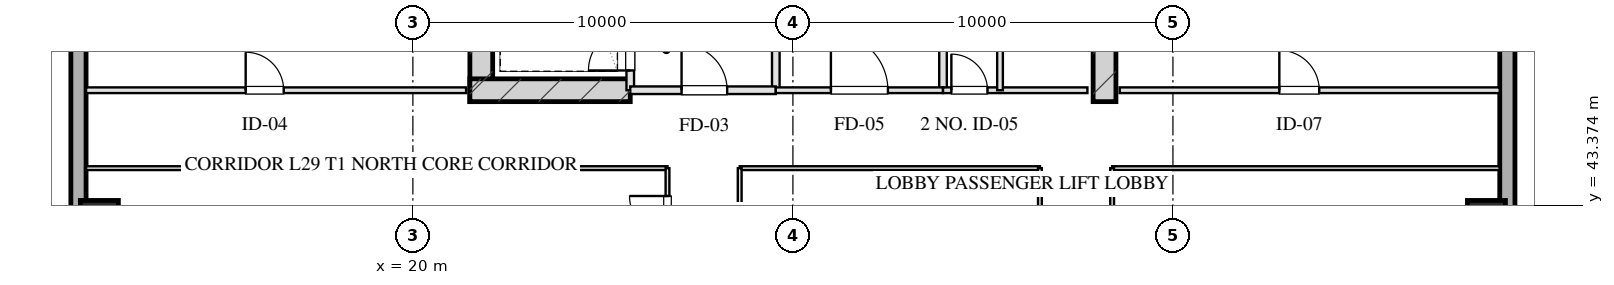
"""IFC4 building model, lengths in metres.
Left out: names, types, materials, properties, quantities, classifications, styles, units other than length and angle.
Written with IfcOpenShell. Run it as: python <this file> out.ifc"""

import sys

from ifc_helpers import new_model, si_unit, direction, frame, frame_2d, origin, origin_2d, place, context, subcontext, project, spatial, rectangle, hollow_rectangle, extrude, element, fill, save


model = new_model("IFC4")
c1 = context("Model", 3, precision=1e-05, world=origin(), true_north=direction((0.0, 1.0)))
c2 = subcontext(c1, "Body", "Model", "MODEL_VIEW")
j1 = project(units=[si_unit("LENGTHUNIT", "METRE"), si_unit("PLANEANGLEUNIT", "RADIAN")], contexts=[c1])
p1 = place(None, origin())
s1 = spatial("IfcSite", under=j1, at=p1, CompositionType="ELEMENT")
p2 = place(p1, origin())
s2 = spatial("IfcBuilding", under=s1, at=p2, CompositionType="ELEMENT")
p3 = place(p2, frame((0.0, 0.0, 113.85)))
s3 = spatial("IfcBuildingStorey", under=s2, at=p3, CompositionType="ELEMENT", Elevation=113.85)
for number, where, z_axis, x_axis in (
    (1, (21.8, 46.1, 0.0), (0.0, 0.0, 1.0), (0.0, 1.0, 0.0)),
    (2, (38.2, 46.1, 0.0), (0.0, 0.0, 1.0), (0.0, 1.0, 0.0)),
):
    element("IfcWall", number, at=place(p3, frame(where, z_axis=z_axis, x_axis=x_axis)), inside=s3, PredefinedType="SHEAR", context=c2, shape_type="SweptSolid", body=[
        extrude(rectangle(XDim=9.48, YDim=0.6, at=frame_2d((4.74, 0.0))), origin(), (0.0, 0.0, 1.0), 3.45),
    ])
p4 = place(p3, frame((21.5, 46.4, 0.0), z_axis=(0.0, 0.0, 1.0), x_axis=(1.0, 0.0, 0.0)))
e3 = element("IfcWall", 3, at=p4, inside=s3, PredefinedType="SHEAR", context=c2, shape_type="SweptSolid", body=[
    extrude(rectangle(XDim=4.22, YDim=0.6, at=frame_2d((2.11, 0.0))), origin(), (0.0, 0.0, 1.0), 3.45),
])
for number, where, z_axis, x_axis in (
    (4, (11.75, 43.0, 0.0), (0.0, 0.0, 1.0), (1.0, 0.0, 0.0)),
    (5, (48.25, 43.0, 0.0), (0.0, 0.0, 1.0), (1.0, 0.0, 0.0)),
):
    element("IfcColumn", number, at=place(p3, frame(where, z_axis=z_axis, x_axis=x_axis)), inside=s3, PredefinedType="COLUMN", context=c2, shape_type="SweptSolid", body=[
        extrude(hollow_rectangle(XDim=1.0, YDim=1.0, WallThickness=0.036, at=origin_2d()), origin(), (0.0, 0.0, 1.0), 3.451),
    ])
p5 = place(p3, frame((11.2, 9.0, 0.0), z_axis=(0.0, 0.0, 1.0), x_axis=(0.0, 1.0, 0.0)))
e6 = element("IfcWall", 6, at=p5, inside=s3, PredefinedType="SOLIDWALL", context=c2, shape_type="SweptSolid", body=[
    extrude(rectangle(XDim=50.0, YDim=0.4, at=frame_2d((25.0, 0.0))), origin(), (0.0, 0.0, 1.0), 2.61),
])
p6 = place(p5, frame((27.336, 0.0, 0.0)))
e7 = element("IfcOpeningElement", 7, at=p6, cuts=e6, PredefinedType="OPENING", context=c2, shape_type="SweptSolid", body=[
    extrude(rectangle(XDim=1.1, YDim=2.15, at=frame_2d((0.55, 1.075))), frame((0.0, 0.21, 0.0), z_axis=(0.0, -1.0, 0.0), x_axis=(1.0, 0.0, 0.0)), (0.0, 0.0, 1.0), 0.42),
])
p7 = place(p3, frame((48.8, 59.0, 0.0), z_axis=(0.0, 0.0, 1.0), x_axis=(0.0, -1.0, 0.0)))
e8 = element("IfcWall", 8, at=p7, inside=s3, PredefinedType="SOLIDWALL", context=c2, shape_type="SweptSolid", body=[
    extrude(rectangle(XDim=50.0, YDim=0.4, at=frame_2d((25.0, 0.0))), origin(), (0.0, 0.0, 1.0), 2.61),
])
p8 = place(p7, frame((30.2, 0.0, 0.75)))
e9 = element("IfcOpeningElement", 9, at=p8, cuts=e8, PredefinedType="OPENING", context=c2, shape_type="SweptSolid", body=[
    extrude(rectangle(XDim=2.4, YDim=1.46, at=frame_2d((1.2, 0.73))), frame((0.0, 0.21, 0.0), z_axis=(0.0, -1.0, 0.0), x_axis=(1.0, 0.0, 0.0)), (0.0, 0.0, 1.0), 0.42),
])
p9 = place(p7, frame((18.65, 0.0, 0.0)))
e10 = element("IfcOpeningElement", 10, at=p9, cuts=e8, PredefinedType="OPENING", context=c2, shape_type="SweptSolid", body=[
    extrude(rectangle(XDim=1.1, YDim=2.15, at=frame_2d((0.55, 1.075))), frame((0.0, 0.21, 0.0), z_axis=(0.0, -1.0, 0.0), x_axis=(1.0, 0.0, 0.0)), (0.0, 0.0, 1.0), 0.42),
])
p10 = place(p3, frame((25.72, 46.4, 0.0), z_axis=(0.0, 0.0, 1.0), x_axis=(0.0, 1.0, 0.0)))
e11 = element("IfcWall", 11, at=p10, inside=s3, PredefinedType="PARTITIONING", context=c2, shape_type="SweptSolid", body=[
    extrude(rectangle(XDim=1.9, YDim=0.2, at=frame_2d((0.95, 0.0))), origin(), (0.0, 0.0, 1.0), 3.175),
])
p11 = place(p10, frame((0.52, 0.0, 0.0)))
e12 = element("IfcOpeningElement", 12, at=p11, cuts=e11, PredefinedType="OPENING", context=c2, shape_type="SweptSolid", body=[
    extrude(rectangle(XDim=1.1, YDim=2.05, at=frame_2d((0.55, 1.025))), frame((0.0, 0.11, 0.0), z_axis=(0.0, -1.0, 0.0), x_axis=(1.0, 0.0, 0.0)), (0.0, 0.0, 1.0), 0.22),
])
p12 = place(p3, frame((29.55, 46.4, 0.0), z_axis=(0.0, 0.0, 1.0), x_axis=(0.0, 1.0, 0.0)))
e13 = element("IfcWall", 13, at=p12, inside=s3, PredefinedType="PARTITIONING", context=c2, shape_type="SweptSolid", body=[
    extrude(rectangle(XDim=8.43, YDim=0.2, at=frame_2d((4.215, 0.0))), origin(), (0.0, 0.0, 1.0), 3.175),
])
p13 = place(p3, frame((25.72, 46.4, 0.0), z_axis=(0.0, 0.0, 1.0), x_axis=(1.0, 0.0, 0.0)))
e14 = element("IfcWall", 14, at=p13, inside=s3, PredefinedType="PARTITIONING", context=c2, shape_type="SweptSolid", body=[
    extrude(rectangle(XDim=3.83, YDim=0.2, at=frame_2d((1.915, 0.0))), origin(), (0.0, 0.0, 1.0), 3.175),
])
p14 = place(p13, frame((1.35, 0.0, 0.0)))
e15 = element("IfcOpeningElement", 15, at=p14, cuts=e14, PredefinedType="OPENING", context=c2, shape_type="SweptSolid", body=[
    extrude(rectangle(XDim=1.2, YDim=2.05, at=frame_2d((0.6, 1.025))), frame((0.0, 0.11, 0.0), z_axis=(0.0, -1.0, 0.0), x_axis=(1.0, 0.0, 0.0)), (0.0, 0.0, 1.0), 0.22),
])
p15 = place(p3, frame((33.95, 46.4, 0.0), z_axis=(0.0, 0.0, 1.0), x_axis=(0.0, 1.0, 0.0)))
e16 = element("IfcWall", 16, at=p15, inside=s3, PredefinedType="PARTITIONING", context=c2, shape_type="SweptSolid", body=[
    extrude(rectangle(XDim=8.43, YDim=0.2, at=frame_2d((4.215, 0.0))), origin(), (0.0, 0.0, 1.0), 3.175),
])
p16 = place(p3, frame((29.55, 46.4, 0.0), z_axis=(0.0, 0.0, 1.0), x_axis=(1.0, 0.0, 0.0)))
e17 = element("IfcWall", 17, at=p16, inside=s3, PredefinedType="PARTITIONING", context=c2, shape_type="SweptSolid", body=[
    extrude(rectangle(XDim=4.4, YDim=0.15, at=frame_2d((2.2, 0.0))), origin(), (0.0, 0.0, 1.0), 3.175),
])
p17 = place(p16, frame((1.45, 0.0, 0.0)))
e18 = element("IfcOpeningElement", 18, at=p17, cuts=e17, PredefinedType="OPENING", context=c2, shape_type="SweptSolid", body=[
    extrude(rectangle(XDim=1.5, YDim=2.05, at=frame_2d((0.75, 1.025))), frame((0.0, 0.085, 0.0), z_axis=(0.0, -1.0, 0.0), x_axis=(1.0, 0.0, 0.0)), (0.0, 0.0, 1.0), 0.17),
])
p18 = place(p3, frame((33.95, 46.4, 0.0), z_axis=(0.0, 0.0, 1.0), x_axis=(1.0, 0.0, 0.0)))
e19 = element("IfcWall", 19, at=p18, inside=s3, PredefinedType="PARTITIONING", context=c2, shape_type="SweptSolid", body=[
    extrude(rectangle(XDim=3.8, YDim=0.15, at=frame_2d((1.9, 0.0))), origin(), (0.0, 0.0, 1.0), 3.175),
])
p19 = place(p18, frame((0.22, 0.0, 0.0)))
e20 = element("IfcOpeningElement", 20, at=p19, cuts=e19, PredefinedType="OPENING", context=c2, shape_type="SweptSolid", body=[
    extrude(rectangle(XDim=0.95, YDim=2.05, at=frame_2d((0.475, 1.025))), frame((0.0, 0.085, 0.0), z_axis=(0.0, -1.0, 0.0), x_axis=(1.0, 0.0, 0.0)), (0.0, 0.0, 1.0), 0.17),
])
p20 = place(p3, frame((35.45, 46.4, 0.0), z_axis=(0.0, 0.0, 1.0), x_axis=(0.0, 1.0, 0.0)))
e21 = element("IfcWall", 21, at=p20, inside=s3, PredefinedType="PARTITIONING", context=c2, shape_type="SweptSolid", body=[
    extrude(rectangle(XDim=8.43, YDim=0.15, at=frame_2d((4.215, 0.0))), origin(), (0.0, 0.0, 1.0), 2.815),
])
p21 = place(p20, frame((2.55, 0.0, 0.0)))
e22 = element("IfcOpeningElement", 22, at=p21, cuts=e21, PredefinedType="OPENING", context=c2, shape_type="SweptSolid", body=[
    extrude(rectangle(XDim=0.95, YDim=2.05, at=frame_2d((0.475, 1.025))), frame((0.0, 0.085, 0.0), z_axis=(0.0, -1.0, 0.0), x_axis=(1.0, 0.0, 0.0)), (0.0, 0.0, 1.0), 0.17),
])
p22 = place(p20, frame((5.8, 0.0, 0.0)))
e23 = element("IfcOpeningElement", 23, at=p22, cuts=e21, PredefinedType="OPENING", context=c2, shape_type="SweptSolid", body=[
    extrude(rectangle(XDim=0.9, YDim=2.05, at=frame_2d((0.45, 1.025))), frame((0.0, 0.085, 0.0), z_axis=(0.0, -1.0, 0.0), x_axis=(1.0, 0.0, 0.0)), (0.0, 0.0, 1.0), 0.17),
])
p23 = place(p3, frame((11.4, 46.4, 0.0), z_axis=(0.0, 0.0, 1.0), x_axis=(1.0, 0.0, 0.0)))
e24 = element("IfcWall", 24, at=p23, inside=s3, PredefinedType="PARTITIONING", context=c2, shape_type="SweptSolid", body=[
    extrude(rectangle(XDim=10.0, YDim=0.15, at=frame_2d((5.0, 0.0))), origin(), (0.0, 0.0, 1.0), 3.175),
])
p24 = place(p23, frame((4.2, 0.0, 0.0)))
e25 = element("IfcOpeningElement", 25, at=p24, cuts=e24, PredefinedType="OPENING", context=c2, shape_type="SweptSolid", body=[
    extrude(rectangle(XDim=1.0, YDim=2.05, at=frame_2d((0.5, 1.025))), frame((0.0, 0.085, 0.0), z_axis=(0.0, -1.0, 0.0), x_axis=(1.0, 0.0, 0.0)), (0.0, 0.0, 1.0), 0.17),
])
p25 = place(p3, frame((38.6, 46.4, 0.0), z_axis=(0.0, 0.0, 1.0), x_axis=(1.0, 0.0, 0.0)))
e26 = element("IfcWall", 26, at=p25, inside=s3, PredefinedType="PARTITIONING", context=c2, shape_type="SweptSolid", body=[
    extrude(rectangle(XDim=10.0, YDim=0.15, at=frame_2d((5.0, 0.0))), origin(), (0.0, 0.0, 1.0), 3.175),
])
p26 = place(p25, frame((4.2, 0.0, 0.0)))
e27 = element("IfcOpeningElement", 27, at=p26, cuts=e26, PredefinedType="OPENING", context=c2, shape_type="SweptSolid", body=[
    extrude(rectangle(XDim=1.05, YDim=2.05, at=frame_2d((0.525, 1.025))), frame((0.0, 0.085, 0.0), z_axis=(0.0, -1.0, 0.0), x_axis=(1.0, 0.0, 0.0)), (0.0, 0.0, 1.0), 0.17),
])
p27 = place(p3, frame((11.4, 44.35, 0.0), z_axis=(0.0, 0.0, 1.0), x_axis=(1.0, 0.0, 0.0)))
e28 = element("IfcWall", 28, at=p27, inside=s3, PredefinedType="MOVABLE", context=c2, shape_type="SweptSolid", body=[
    extrude(rectangle(XDim=15.3, YDim=0.1, at=frame_2d((7.65, 0.0))), origin(), (0.0, 0.0, 1.0), 3.175),
])
p28 = place(p3, frame((28.6, 44.35, 0.0), z_axis=(0.0, 0.0, 1.0), x_axis=(1.0, 0.0, 0.0)))
e29 = element("IfcWall", 29, at=p28, inside=s3, PredefinedType="MOVABLE", context=c2, shape_type="SweptSolid", body=[
    extrude(rectangle(XDim=7.9, YDim=0.1, at=frame_2d((3.95, 0.0))), origin(), (0.0, 0.0, 1.0), 3.175),
])
p29 = place(p3, frame((38.4, 44.35, 0.0), z_axis=(0.0, 0.0, 1.0), x_axis=(1.0, 0.0, 0.0)))
e30 = element("IfcWall", 30, at=p29, inside=s3, PredefinedType="MOVABLE", context=c2, shape_type="SweptSolid", body=[
    extrude(rectangle(XDim=10.2, YDim=0.1, at=frame_2d((5.1, 0.0))), origin(), (0.0, 0.0, 1.0), 3.175),
])
p30 = place(p3, frame((26.7, 23.65, 0.0), z_axis=(0.0, 0.0, 1.0), x_axis=(0.0, 1.0, 0.0)))
e31 = element("IfcWall", 31, at=p30, inside=s3, PredefinedType="MOVABLE", context=c2, shape_type="SweptSolid", body=[
    extrude(rectangle(XDim=20.7, YDim=0.1, at=frame_2d((10.35, 0.0))), origin(), (0.0, 0.0, 1.0), 3.175),
])
p31 = place(p30, frame((0.775, 0.0, 0.0)))
e32 = element("IfcOpeningElement", 32, at=p31, cuts=e31, PredefinedType="OPENING", context=c2, shape_type="SweptSolid", body=[
    extrude(rectangle(XDim=1.0, YDim=2.05, at=frame_2d((0.5, 1.025))), frame((0.0, 0.06, 0.0), z_axis=(0.0, -1.0, 0.0), x_axis=(1.0, 0.0, 0.0)), (0.0, 0.0, 1.0), 0.12),
])
p32 = place(p30, frame((3.95, 0.0, 0.0)))
e33 = element("IfcOpeningElement", 33, at=p32, cuts=e31, PredefinedType="OPENING", context=c2, shape_type="SweptSolid", body=[
    extrude(rectangle(XDim=1.0, YDim=2.05, at=frame_2d((0.5, 1.025))), frame((0.0, 0.06, 0.0), z_axis=(0.0, -1.0, 0.0), x_axis=(1.0, 0.0, 0.0)), (0.0, 0.0, 1.0), 0.12),
])
p33 = place(p30, frame((8.273, 0.0, 0.0)))
e34 = element("IfcOpeningElement", 34, at=p33, cuts=e31, PredefinedType="OPENING", context=c2, shape_type="SweptSolid", body=[
    extrude(rectangle(XDim=1.0, YDim=2.05, at=frame_2d((0.5, 1.025))), frame((0.0, 0.06, 0.0), z_axis=(0.0, -1.0, 0.0), x_axis=(1.0, 0.0, 0.0)), (0.0, 0.0, 1.0), 0.12),
])
p34 = place(p30, frame((12.559, 0.0, 0.0)))
e35 = element("IfcOpeningElement", 35, at=p34, cuts=e31, PredefinedType="OPENING", context=c2, shape_type="SweptSolid", body=[
    extrude(rectangle(XDim=0.85, YDim=2.05, at=frame_2d((0.425, 1.025))), frame((0.0, 0.06, 0.0), z_axis=(0.0, -1.0, 0.0), x_axis=(1.0, 0.0, 0.0)), (0.0, 0.0, 1.0), 0.12),
])
p35 = place(p30, frame((16.078, 0.0, 0.0)))
e36 = element("IfcOpeningElement", 36, at=p35, cuts=e31, PredefinedType="OPENING", context=c2, shape_type="SweptSolid", body=[
    extrude(rectangle(XDim=1.0, YDim=2.05, at=frame_2d((0.5, 1.025))), frame((0.0, 0.06, 0.0), z_axis=(0.0, -1.0, 0.0), x_axis=(1.0, 0.0, 0.0)), (0.0, 0.0, 1.0), 0.12),
])
p36 = place(p30, frame((18.967, 0.0, 0.0)))
e37 = element("IfcOpeningElement", 37, at=p36, cuts=e31, PredefinedType="OPENING", context=c2, shape_type="SweptSolid", body=[
    extrude(rectangle(XDim=1.0, YDim=2.05, at=frame_2d((0.5, 1.025))), frame((0.0, 0.06, 0.0), z_axis=(0.0, -1.0, 0.0), x_axis=(1.0, 0.0, 0.0)), (0.0, 0.0, 1.0), 0.12),
])
p37 = place(p3, frame((28.6, 23.65, 0.0), z_axis=(0.0, 0.0, 1.0), x_axis=(0.0, 1.0, 0.0)))
e38 = element("IfcWall", 38, at=p37, inside=s3, PredefinedType="MOVABLE", context=c2, shape_type="SweptSolid", body=[
    extrude(rectangle(XDim=20.7, YDim=0.1, at=frame_2d((10.35, 0.0))), origin(), (0.0, 0.0, 1.0), 3.175),
])
p38 = place(p37, frame((5.198, 0.0, 0.0)))
e39 = element("IfcOpeningElement", 39, at=p38, cuts=e38, PredefinedType="OPENING", context=c2, shape_type="SweptSolid", body=[
    extrude(rectangle(XDim=1.1, YDim=2.05, at=frame_2d((0.55, 1.025))), frame((0.0, 0.06, 0.0), z_axis=(0.0, -1.0, 0.0), x_axis=(1.0, 0.0, 0.0)), (0.0, 0.0, 1.0), 0.12),
])
p39 = place(p37, frame((15.667, 0.0, 0.0)))
e40 = element("IfcOpeningElement", 40, at=p39, cuts=e38, PredefinedType="OPENING", context=c2, shape_type="SweptSolid", body=[
    extrude(rectangle(XDim=1.1, YDim=2.05, at=frame_2d((0.55, 1.025))), frame((0.0, 0.06, 0.0), z_axis=(0.0, -1.0, 0.0), x_axis=(1.0, 0.0, 0.0)), (0.0, 0.0, 1.0), 0.12),
])
p40 = place(p3, frame((36.5, 23.65, 0.0), z_axis=(0.0, 0.0, 1.0), x_axis=(0.0, 1.0, 0.0)))
e41 = element("IfcWall", 41, at=p40, inside=s3, PredefinedType="MOVABLE", context=c2, shape_type="SweptSolid", body=[
    extrude(rectangle(XDim=20.7, YDim=0.1, at=frame_2d((10.35, 0.0))), origin(), (0.0, 0.0, 1.0), 3.175),
])
p41 = place(p3, frame((38.4, 23.65, 0.0), z_axis=(0.0, 0.0, 1.0), x_axis=(0.0, 1.0, 0.0)))
e42 = element("IfcWall", 42, at=p41, inside=s3, PredefinedType="MOVABLE", context=c2, shape_type="SweptSolid", body=[
    extrude(rectangle(XDim=20.7, YDim=0.1, at=frame_2d((10.35, 0.0))), origin(), (0.0, 0.0, 1.0), 3.175),
])
p42 = place(p41, frame((2.699, 0.0, 0.0)))
e43 = element("IfcOpeningElement", 43, at=p42, cuts=e42, PredefinedType="OPENING", context=c2, shape_type="SweptSolid", body=[
    extrude(rectangle(XDim=1.0, YDim=2.05, at=frame_2d((0.5, 1.025))), frame((0.0, 0.06, 0.0), z_axis=(0.0, -1.0, 0.0), x_axis=(1.0, 0.0, 0.0)), (0.0, 0.0, 1.0), 0.12),
])
p43 = place(p41, frame((9.875, 0.0, 0.0)))
e44 = element("IfcOpeningElement", 44, at=p43, cuts=e42, PredefinedType="OPENING", context=c2, shape_type="SweptSolid", body=[
    extrude(rectangle(XDim=1.0, YDim=2.05, at=frame_2d((0.5, 1.025))), frame((0.0, 0.06, 0.0), z_axis=(0.0, -1.0, 0.0), x_axis=(1.0, 0.0, 0.0)), (0.0, 0.0, 1.0), 0.12),
])
p44 = place(p41, frame((17.025, 0.0, 0.0)))
e45 = element("IfcOpeningElement", 45, at=p44, cuts=e42, PredefinedType="OPENING", context=c2, shape_type="SweptSolid", body=[
    extrude(rectangle(XDim=1.0, YDim=2.05, at=frame_2d((0.5, 1.025))), frame((0.0, 0.06, 0.0), z_axis=(0.0, -1.0, 0.0), x_axis=(1.0, 0.0, 0.0)), (0.0, 0.0, 1.0), 0.12),
])
p45 = place(p11, origin())
e46 = element("IfcDoor", 46, at=p45, inside=s3, OperationType="SINGLE_SWING_LEFT", PredefinedType="DOOR", context=c2, shape_type="SweptSolid", body=[
    extrude(rectangle(XDim=1.1, YDim=2.05, at=frame_2d((0.55, 1.025))), frame((0.0, 0.025, 0.0), z_axis=(0.0, -1.0, 0.0), x_axis=(1.0, 0.0, 0.0)), (0.0, 0.0, 1.0), 0.05),
])
fill(e12, e46)
p46 = place(p14, origin())
e47 = element("IfcDoor", 47, at=p46, inside=s3, OperationType="SINGLE_SWING_LEFT", PredefinedType="DOOR", context=c2, shape_type="SweptSolid", body=[
    extrude(rectangle(XDim=1.2, YDim=2.05, at=frame_2d((0.6, 1.025))), frame((0.0, 0.025, 0.0), z_axis=(0.0, -1.0, 0.0), x_axis=(1.0, 0.0, 0.0)), (0.0, 0.0, 1.0), 0.05),
])
fill(e15, e47)
p47 = place(p17, origin())
e48 = element("IfcDoor", 48, at=p47, inside=s3, OperationType="SINGLE_SWING_LEFT", PredefinedType="DOOR", context=c2, shape_type="SweptSolid", body=[
    extrude(rectangle(XDim=1.5, YDim=2.05, at=frame_2d((0.75, 1.025))), frame((0.0, 0.025, 0.0), z_axis=(0.0, -1.0, 0.0), x_axis=(1.0, 0.0, 0.0)), (0.0, 0.0, 1.0), 0.05),
])
fill(e18, e48)
p48 = place(p19, origin())
e49 = element("IfcDoor", 49, at=p48, inside=s3, OperationType="SINGLE_SWING_LEFT", PredefinedType="DOOR", context=c2, shape_type="SweptSolid", body=[
    extrude(rectangle(XDim=0.95, YDim=2.05, at=frame_2d((0.475, 1.025))), frame((0.0, 0.025, 0.0), z_axis=(0.0, -1.0, 0.0), x_axis=(1.0, 0.0, 0.0)), (0.0, 0.0, 1.0), 0.05),
])
fill(e20, e49)
p49 = place(p24, origin())
e50 = element("IfcDoor", 50, at=p49, inside=s3, OperationType="SINGLE_SWING_LEFT", PredefinedType="DOOR", context=c2, shape_type="SweptSolid", body=[
    extrude(rectangle(XDim=1.0, YDim=2.05, at=frame_2d((0.5, 1.025))), frame((0.0, 0.025, 0.0), z_axis=(0.0, -1.0, 0.0), x_axis=(1.0, 0.0, 0.0)), (0.0, 0.0, 1.0), 0.05),
])
fill(e25, e50)
p50 = place(p26, origin())
e51 = element("IfcDoor", 51, at=p50, inside=s3, OperationType="SINGLE_SWING_LEFT", PredefinedType="DOOR", context=c2, shape_type="SweptSolid", body=[
    extrude(rectangle(XDim=1.05, YDim=2.05, at=frame_2d((0.525, 1.025))), frame((0.0, 0.025, 0.0), z_axis=(0.0, -1.0, 0.0), x_axis=(1.0, 0.0, 0.0)), (0.0, 0.0, 1.0), 0.05),
])
fill(e27, e51)
p51 = place(p36, origin())
e52 = element("IfcDoor", 52, at=p51, inside=s3, OperationType="SINGLE_SWING_RIGHT", PredefinedType="DOOR", context=c2, shape_type="SweptSolid", body=[
    extrude(rectangle(XDim=1.0, YDim=2.05, at=frame_2d((0.5, 1.025))), frame((0.0, 0.025, 0.0), z_axis=(0.0, -1.0, 0.0), x_axis=(1.0, 0.0, 0.0)), (0.0, 0.0, 1.0), 0.05),
])
fill(e37, e52)
save(model, sys.argv[1])
